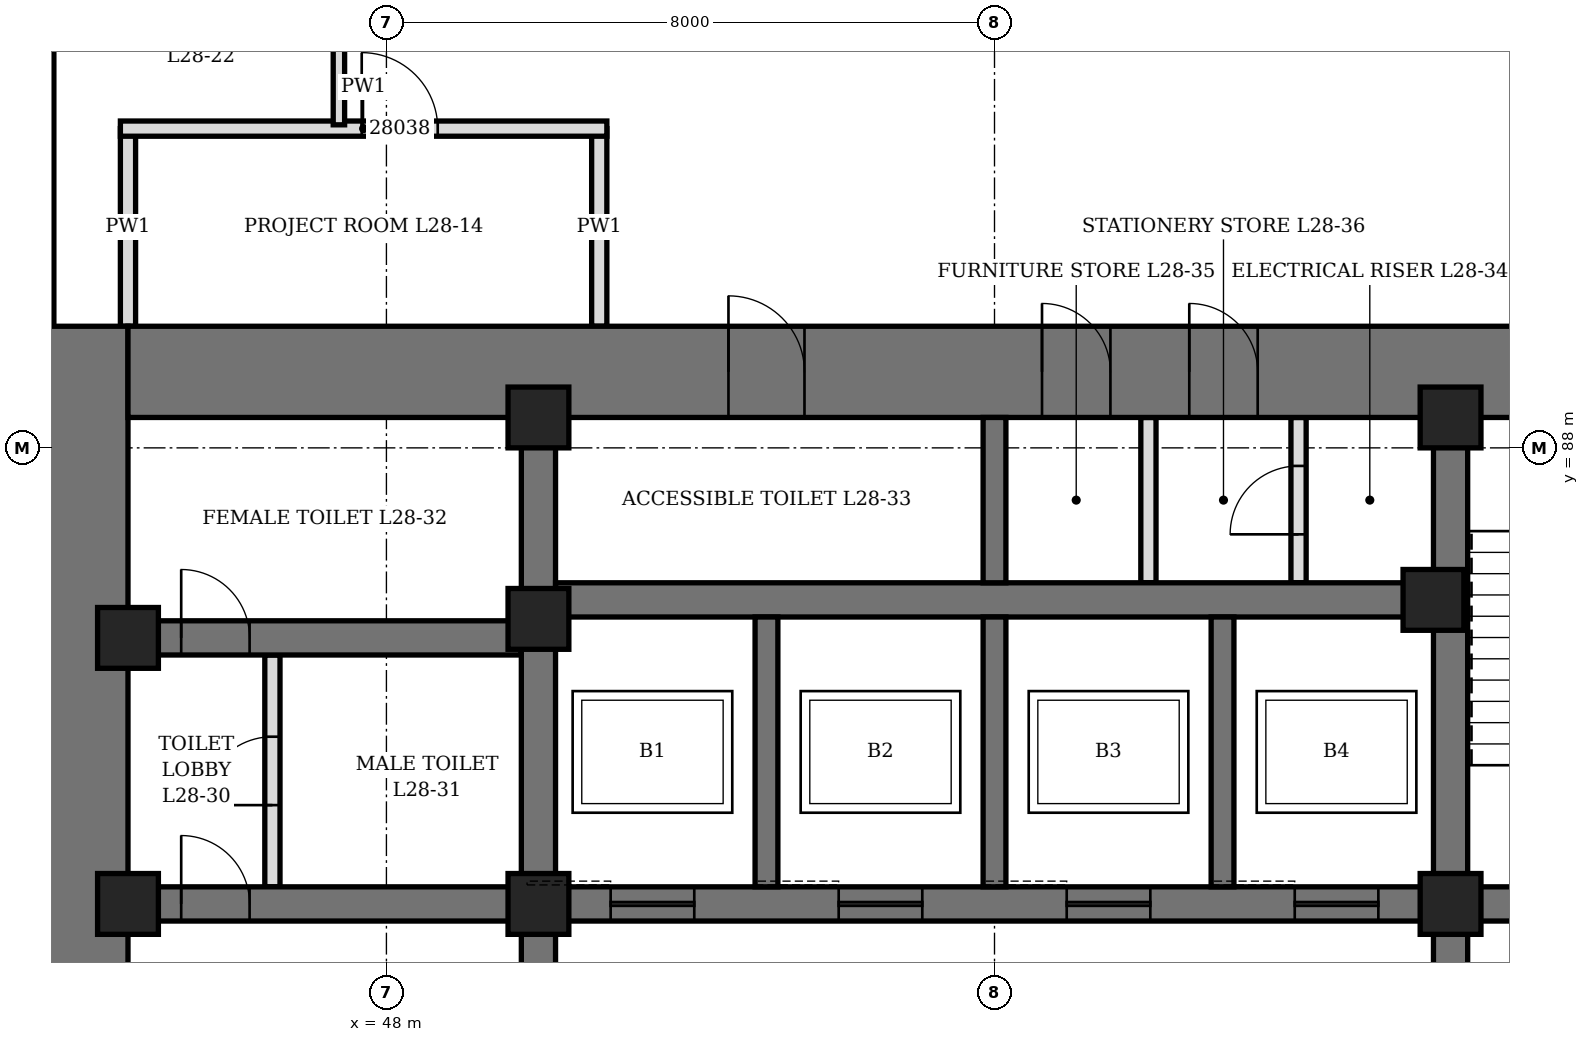
"""IFC4 building model, lengths in metres.
Left out: names, types, materials, properties, quantities, classifications, styles, units other than length and angle.
Written with IfcOpenShell. Run it as: python <this file> out.ifc"""

import sys

from ifc_helpers import new_model, si_unit, direction, frame, frame_2d, origin, origin_2d, place, context, subcontext, project, spatial, rectangle, hollow_rectangle, extrude, element, fill, save


model = new_model("IFC4")
c1 = context("Model", 3, precision=1e-05, world=origin(), true_north=direction((0.0, 1.0)))
c2 = subcontext(c1, "Body", "Model", "MODEL_VIEW")
j1 = project(units=[si_unit("LENGTHUNIT", "METRE"), si_unit("PLANEANGLEUNIT", "RADIAN")], contexts=[c1])
p1 = place(None, origin())
s1 = spatial("IfcSite", under=j1, at=p1, CompositionType="ELEMENT")
p2 = place(p1, origin())
s2 = spatial("IfcBuilding", under=s1, at=p2, CompositionType="ELEMENT")
p3 = place(p2, frame((0.0, 0.0, 129.1)))
s3 = spatial("IfcBuildingStorey", under=s2, at=p3, CompositionType="ELEMENT", Elevation=129.1)
p4 = place(p3, frame((44.0, 70.4, 0.0), z_axis=(0.0, 0.0, 1.0), x_axis=(0.0, 1.0, 0.0)))
e1 = element("IfcWall", 1, at=p4, inside=s3, PredefinedType="SHEAR", context=c2, shape_type="SweptSolid", body=[
    extrude(rectangle(XDim=19.2, YDim=1.2, at=frame_2d((9.6, 0.0))), origin(), (0.0, 0.0, 1.0), 4.2),
])
p5 = place(p4, frame((8.6, 0.0, 0.0)))
e2 = element("IfcOpeningElement", 2, at=p5, cuts=e1, PredefinedType="OPENING", context=c2, shape_type="SweptSolid", body=[
    extrude(rectangle(XDim=2.0, YDim=2.4, at=frame_2d((1.0, 1.2))), frame((0.0, 0.61, 0.0), z_axis=(0.0, -1.0, 0.0), x_axis=(1.0, 0.0, 0.0)), (0.0, 0.0, 1.0), 1.22),
])
p6 = place(p3, frame((44.6, 89.0, 0.0), z_axis=(0.0, 0.0, 1.0), x_axis=(1.0, 0.0, 0.0)))
e3 = element("IfcWall", 3, at=p6, inside=s3, PredefinedType="SHEAR", context=c2, shape_type="SweptSolid", body=[
    extrude(rectangle(XDim=22.8, YDim=1.2, at=frame_2d((11.4, 0.0))), origin(), (0.0, 0.0, 1.0), 4.2),
])
p7 = place(p6, frame((7.9, 0.0, 0.0)))
e4 = element("IfcOpeningElement", 4, at=p7, cuts=e3, PredefinedType="OPENING", context=c2, shape_type="SweptSolid", body=[
    extrude(rectangle(XDim=1.0, YDim=2.1, at=frame_2d((0.5, 1.05))), frame((0.0, 0.61, 0.0), z_axis=(0.0, -1.0, 0.0), x_axis=(1.0, 0.0, 0.0)), (0.0, 0.0, 1.0), 1.22),
])
p8 = place(p6, frame((12.025, 0.0, 0.0)))
e5 = element("IfcOpeningElement", 5, at=p8, cuts=e3, PredefinedType="OPENING", context=c2, shape_type="SweptSolid", body=[
    extrude(rectangle(XDim=0.9, YDim=2.1, at=frame_2d((0.45, 1.05))), frame((0.0, 0.61, 0.0), z_axis=(0.0, -1.0, 0.0), x_axis=(1.0, 0.0, 0.0)), (0.0, 0.0, 1.0), 1.22),
])
p9 = place(p6, frame((13.962, 0.0, 0.0)))
e6 = element("IfcOpeningElement", 6, at=p9, cuts=e3, PredefinedType="OPENING", context=c2, shape_type="SweptSolid", body=[
    extrude(rectangle(XDim=0.9, YDim=2.1, at=frame_2d((0.45, 1.05))), frame((0.0, 0.61, 0.0), z_axis=(0.0, -1.0, 0.0), x_axis=(1.0, 0.0, 0.0)), (0.0, 0.0, 1.0), 1.22),
])
p10 = place(p3, frame((50.0, 71.6, 0.0), z_axis=(0.0, 0.0, 1.0), x_axis=(0.0, 1.0, 0.0)))
e7 = element("IfcWall", 7, at=p10, inside=s3, PredefinedType="SHEAR", context=c2, shape_type="SweptSolid", body=[
    extrude(rectangle(XDim=16.8, YDim=0.45, at=frame_2d((8.4, 0.0))), origin(), (0.0, 0.0, 1.0), 4.2),
])
p11 = place(p10, frame((7.5, 0.0, 0.0)))
e8 = element("IfcOpeningElement", 8, at=p11, cuts=e7, PredefinedType="OPENING", context=c2, shape_type="SweptSolid", body=[
    extrude(rectangle(XDim=1.8, YDim=2.4, at=frame_2d((0.9, 1.2))), frame((0.0, 0.235, 0.0), z_axis=(0.0, -1.0, 0.0), x_axis=(1.0, 0.0, 0.0)), (0.0, 0.0, 1.0), 0.47),
])
p12 = place(p3, frame((62.0, 71.6, 0.0), z_axis=(0.0, 0.0, 1.0), x_axis=(0.0, 1.0, 0.0)))
e9 = element("IfcWall", 9, at=p12, inside=s3, PredefinedType="SHEAR", context=c2, shape_type="SweptSolid", body=[
    extrude(rectangle(XDim=16.8, YDim=0.45, at=frame_2d((8.4, 0.0))), origin(), (0.0, 0.0, 1.0), 4.2),
])
p13 = place(p12, frame((7.5, 0.0, 0.0)))
e10 = element("IfcOpeningElement", 10, at=p13, cuts=e9, PredefinedType="OPENING", context=c2, shape_type="SweptSolid", body=[
    extrude(rectangle(XDim=1.8, YDim=2.4, at=frame_2d((0.9, 1.2))), frame((0.0, 0.235, 0.0), z_axis=(0.0, -1.0, 0.0), x_axis=(1.0, 0.0, 0.0)), (0.0, 0.0, 1.0), 0.47),
])
p14 = place(p3, frame((44.6, 82.0, 0.0), z_axis=(0.0, 0.0, 1.0), x_axis=(1.0, 0.0, 0.0)))
e11 = element("IfcWall", 11, at=p14, inside=s3, PredefinedType="SHEAR", context=c2, shape_type="SweptSolid", body=[
    extrude(rectangle(XDim=5.175, YDim=0.45, at=frame_2d((2.587, 0.0))), origin(), (0.0, 0.0, 1.0), 4.2),
])
p15 = place(p14, frame((0.7, 0.0, 0.0)))
e12 = element("IfcOpeningElement", 12, at=p15, cuts=e11, PredefinedType="OPENING", context=c2, shape_type="SweptSolid", body=[
    extrude(rectangle(XDim=0.9, YDim=2.1, at=frame_2d((0.45, 1.05))), frame((0.0, 0.235, 0.0), z_axis=(0.0, -1.0, 0.0), x_axis=(1.0, 0.0, 0.0)), (0.0, 0.0, 1.0), 0.47),
])
p16 = place(p3, frame((44.6, 85.5, 0.0), z_axis=(0.0, 0.0, 1.0), x_axis=(1.0, 0.0, 0.0)))
e13 = element("IfcWall", 13, at=p16, inside=s3, PredefinedType="SHEAR", context=c2, shape_type="SweptSolid", body=[
    extrude(rectangle(XDim=5.175, YDim=0.45, at=frame_2d((2.587, 0.0))), origin(), (0.0, 0.0, 1.0), 4.2),
])
p17 = place(p16, frame((0.7, 0.0, 0.0)))
e14 = element("IfcOpeningElement", 14, at=p17, cuts=e13, PredefinedType="OPENING", context=c2, shape_type="SweptSolid", body=[
    extrude(rectangle(XDim=0.9, YDim=2.1, at=frame_2d((0.45, 1.05))), frame((0.0, 0.235, 0.0), z_axis=(0.0, -1.0, 0.0), x_axis=(1.0, 0.0, 0.0)), (0.0, 0.0, 1.0), 0.47),
])
p18 = place(p3, frame((62.225, 82.0, 0.0), z_axis=(0.0, 0.0, 1.0), x_axis=(1.0, 0.0, 0.0)))
e15 = element("IfcWall", 15, at=p18, inside=s3, PredefinedType="SHEAR", context=c2, shape_type="SweptSolid", body=[
    extrude(rectangle(XDim=5.175, YDim=0.45, at=frame_2d((2.587, 0.0))), origin(), (0.0, 0.0, 1.0), 4.2),
])
p19 = place(p18, frame((2.175, 0.0, 0.0)))
e16 = element("IfcOpeningElement", 16, at=p19, cuts=e15, PredefinedType="OPENING", context=c2, shape_type="SweptSolid", body=[
    extrude(rectangle(XDim=1.2, YDim=2.1, at=frame_2d((0.6, 1.05))), frame((0.0, 0.235, 0.0), z_axis=(0.0, -1.0, 0.0), x_axis=(1.0, 0.0, 0.0)), (0.0, 0.0, 1.0), 0.47),
])
p20 = place(p3, frame((50.225, 82.0, 0.0), z_axis=(0.0, 0.0, 1.0), x_axis=(1.0, 0.0, 0.0)))
e17 = element("IfcWall", 17, at=p20, inside=s3, PredefinedType="SHEAR", context=c2, shape_type="SweptSolid", body=[
    extrude(rectangle(XDim=11.55, YDim=0.45, at=frame_2d((5.775, 0.0))), origin(), (0.0, 0.0, 1.0), 4.2),
])
p21 = place(p20, frame((0.725, 0.0, 0.0)))
e18 = element("IfcOpeningElement", 18, at=p21, cuts=e17, PredefinedType="OPENING", context=c2, shape_type="SweptSolid", body=[
    extrude(rectangle(XDim=1.1, YDim=2.2, at=frame_2d((0.55, 1.1))), frame((0.0, 0.235, 0.0), z_axis=(0.0, -1.0, 0.0), x_axis=(1.0, 0.0, 0.0)), (0.0, 0.0, 1.0), 0.47),
])
p22 = place(p20, frame((3.725, 0.0, 0.0)))
e19 = element("IfcOpeningElement", 19, at=p22, cuts=e17, PredefinedType="OPENING", context=c2, shape_type="SweptSolid", body=[
    extrude(rectangle(XDim=1.1, YDim=2.2, at=frame_2d((0.55, 1.1))), frame((0.0, 0.235, 0.0), z_axis=(0.0, -1.0, 0.0), x_axis=(1.0, 0.0, 0.0)), (0.0, 0.0, 1.0), 0.47),
])
p23 = place(p20, frame((6.725, 0.0, 0.0)))
e20 = element("IfcOpeningElement", 20, at=p23, cuts=e17, PredefinedType="OPENING", context=c2, shape_type="SweptSolid", body=[
    extrude(rectangle(XDim=1.1, YDim=2.2, at=frame_2d((0.55, 1.1))), frame((0.0, 0.235, 0.0), z_axis=(0.0, -1.0, 0.0), x_axis=(1.0, 0.0, 0.0)), (0.0, 0.0, 1.0), 0.47),
])
p24 = place(p20, frame((9.725, 0.0, 0.0)))
e21 = element("IfcOpeningElement", 21, at=p24, cuts=e17, PredefinedType="OPENING", context=c2, shape_type="SweptSolid", body=[
    extrude(rectangle(XDim=1.1, YDim=2.2, at=frame_2d((0.55, 1.1))), frame((0.0, 0.235, 0.0), z_axis=(0.0, -1.0, 0.0), x_axis=(1.0, 0.0, 0.0)), (0.0, 0.0, 1.0), 0.47),
])
p25 = place(p3, frame((50.225, 86.0, 0.0), z_axis=(0.0, 0.0, 1.0), x_axis=(1.0, 0.0, 0.0)))
e22 = element("IfcWall", 22, at=p25, inside=s3, PredefinedType="SHEAR", context=c2, shape_type="SweptSolid", body=[
    extrude(rectangle(XDim=11.55, YDim=0.45, at=frame_2d((5.775, 0.0))), origin(), (0.0, 0.0, 1.0), 4.2),
])
for number, where, z_axis, x_axis in (
    (23, (53.0, 82.225, 0.0), (0.0, 0.0, 1.0), (0.0, 1.0, 0.0)),
    (24, (56.0, 82.225, 0.0), (0.0, 0.0, 1.0), (0.0, 1.0, 0.0)),
    (25, (59.0, 82.225, 0.0), (0.0, 0.0, 1.0), (0.0, 1.0, 0.0)),
):
    element("IfcWall", number, at=place(p3, frame(where, z_axis=z_axis, x_axis=x_axis)), inside=s3, PredefinedType="SHEAR", context=c2, shape_type="SweptSolid", body=[
        extrude(rectangle(XDim=3.55, YDim=0.3, at=frame_2d((1.775, 0.0))), origin(), (0.0, 0.0, 1.0), 4.2),
    ])
p26 = place(p3, frame((56.0, 86.225, 0.0), z_axis=(0.0, 0.0, 1.0), x_axis=(0.0, 1.0, 0.0)))
e26 = element("IfcWall", 26, at=p26, inside=s3, PredefinedType="SHEAR", context=c2, shape_type="SweptSolid", body=[
    extrude(rectangle(XDim=2.175, YDim=0.3, at=frame_2d((1.087, 0.0))), origin(), (0.0, 0.0, 1.0), 4.2),
])
for number, where, z_axis, x_axis in (
    (27, (44.6, 82.0, 0.0), (0.0, 0.0, 1.0), (1.0, 0.0, 0.0)),
    (28, (44.6, 85.5, 0.0), (0.0, 0.0, 1.0), (1.0, 0.0, 0.0)),
    (29, (50.0, 82.0, 0.0), (0.0, 0.0, 1.0), (1.0, 0.0, 0.0)),
    (30, (50.0, 85.75, 0.0), (0.0, 0.0, 1.0), (1.0, 0.0, 0.0)),
    (31, (50.0, 88.4, 0.0), (0.0, 0.0, 1.0), (1.0, 0.0, 0.0)),
    (32, (61.775, 86.0, 0.0), (0.0, 0.0, 1.0), (1.0, 0.0, 0.0)),
    (33, (62.0, 82.0, 0.0), (0.0, 0.0, 1.0), (1.0, 0.0, 0.0)),
    (34, (62.0, 88.4, 0.0), (0.0, 0.0, 1.0), (1.0, 0.0, 0.0)),
):
    element("IfcColumn", number, at=place(p3, frame(where, z_axis=z_axis, x_axis=x_axis)), inside=s3, PredefinedType="COLUMN", context=c2, shape_type="SweptSolid", body=[
        extrude(hollow_rectangle(XDim=0.8, YDim=0.8, WallThickness=0.1, at=origin_2d()), origin(), (0.0, 0.0, 1.0), 4.2),
    ])
p27 = place(p3, frame((46.5, 82.225, 0.0), z_axis=(0.0, 0.0, 1.0), x_axis=(0.0, 1.0, 0.0)))
e35 = element("IfcWall", 35, at=p27, inside=s3, PredefinedType="PARTITIONING", context=c2, shape_type="SweptSolid", body=[
    extrude(rectangle(XDim=3.05, YDim=0.2, at=frame_2d((1.525, 0.0))), origin(), (0.0, 0.0, 1.0), 4.04),
])
p28 = place(p27, frame((1.075, 0.0, 0.0)))
e36 = element("IfcOpeningElement", 36, at=p28, cuts=e35, PredefinedType="OPENING", context=c2, shape_type="SweptSolid", body=[
    extrude(rectangle(XDim=0.9, YDim=2.1, at=frame_2d((0.45, 1.05))), frame((0.0, 0.11, 0.0), z_axis=(0.0, -1.0, 0.0), x_axis=(1.0, 0.0, 0.0)), (0.0, 0.0, 1.0), 0.22),
])
p29 = place(p3, frame((60.0, 86.225, 0.0), z_axis=(0.0, 0.0, 1.0), x_axis=(0.0, 1.0, 0.0)))
e37 = element("IfcWall", 37, at=p29, inside=s3, PredefinedType="PARTITIONING", context=c2, shape_type="SweptSolid", body=[
    extrude(rectangle(XDim=2.175, YDim=0.2, at=frame_2d((1.087, 0.0))), origin(), (0.0, 0.0, 1.0), 4.04),
])
p30 = place(p29, frame((0.637, 0.0, 0.0)))
e38 = element("IfcOpeningElement", 38, at=p30, cuts=e37, PredefinedType="OPENING", context=c2, shape_type="SweptSolid", body=[
    extrude(rectangle(XDim=0.9, YDim=2.1, at=frame_2d((0.45, 1.05))), frame((0.0, 0.11, 0.0), z_axis=(0.0, -1.0, 0.0), x_axis=(1.0, 0.0, 0.0)), (0.0, 0.0, 1.0), 0.22),
])
p31 = place(p3, frame((58.025, 86.225, 0.0), z_axis=(0.0, 0.0, 1.0), x_axis=(0.0, 1.0, 0.0)))
e39 = element("IfcWall", 39, at=p31, inside=s3, PredefinedType="PARTITIONING", context=c2, shape_type="SweptSolid", body=[
    extrude(rectangle(XDim=2.175, YDim=0.2, at=frame_2d((1.087, 0.0))), origin(), (0.0, 0.0, 1.0), 4.04),
])
p32 = place(p3, frame((44.6, 89.6, 0.0), z_axis=(0.0, 0.0, 1.0), x_axis=(0.0, 1.0, 0.0)))
e40 = element("IfcWall", 40, at=p32, inside=s3, PredefinedType="PARTITIONING", context=c2, shape_type="SweptSolid", body=[
    extrude(rectangle(XDim=2.6, YDim=0.2, at=frame_2d((1.3, 0.0))), origin(), (0.0, 0.0, 1.0), 2.74),
])
p33 = place(p3, frame((50.8, 89.6, 0.0), z_axis=(0.0, 0.0, 1.0), x_axis=(0.0, 1.0, 0.0)))
e41 = element("IfcWall", 41, at=p33, inside=s3, PredefinedType="PARTITIONING", context=c2, shape_type="SweptSolid", body=[
    extrude(rectangle(XDim=2.6, YDim=0.2, at=frame_2d((1.3, 0.0))), origin(), (0.0, 0.0, 1.0), 4.04),
])
p34 = place(p3, frame((44.5, 92.2, 0.0), z_axis=(0.0, 0.0, 1.0), x_axis=(1.0, 0.0, 0.0)))
e42 = element("IfcWall", 42, at=p34, inside=s3, PredefinedType="PARTITIONING", context=c2, shape_type="SweptSolid", body=[
    extrude(rectangle(XDim=6.4, YDim=0.2, at=frame_2d((3.2, 0.0))), origin(), (0.0, 0.0, 1.0), 4.04),
])
p35 = place(p34, frame((3.175, 0.0, 0.0)))
e43 = element("IfcOpeningElement", 43, at=p35, cuts=e42, PredefinedType="OPENING", context=c2, shape_type="SweptSolid", body=[
    extrude(rectangle(XDim=1.0, YDim=2.1, at=frame_2d((0.5, 1.05))), frame((0.0, 0.11, 0.0), z_axis=(0.0, -1.0, 0.0), x_axis=(1.0, 0.0, 0.0)), (0.0, 0.0, 1.0), 0.22),
])
p36 = place(p3, frame((43.55, 89.6, 0.0), z_axis=(0.0, 0.0, 1.0), x_axis=(0.0, 1.0, 0.0)))
e44 = element("IfcWall", 44, at=p36, inside=s3, PredefinedType="PARTITIONING", context=c2, shape_type="SweptSolid", body=[
    extrude(rectangle(XDim=13.59, YDim=0.15, at=frame_2d((6.795, 0.0))), origin(), (0.0, 0.0, 1.0), 4.04),
])
p37 = place(p36, frame((6.295, 0.0, 0.0)))
e45 = element("IfcOpeningElement", 45, at=p37, cuts=e44, PredefinedType="OPENING", context=c2, shape_type="SweptSolid", body=[
    extrude(rectangle(XDim=1.0, YDim=2.4, at=frame_2d((0.5, 1.2))), frame((0.0, 0.085, 0.0), z_axis=(0.0, -1.0, 0.0), x_axis=(1.0, 0.0, 0.0)), (0.0, 0.0, 1.0), 0.17),
])
p38 = place(p3, frame((47.375, 92.25, 0.0), z_axis=(0.0, 0.0, 1.0), x_axis=(0.0, 1.0, 0.0)))
e46 = element("IfcWall", 46, at=p38, inside=s3, PredefinedType="PARTITIONING", context=c2, shape_type="SweptSolid", body=[
    extrude(rectangle(XDim=4.95, YDim=0.15, at=frame_2d((2.475, 0.0))), origin(), (0.0, 0.0, 1.0), 3.278),
])
p39 = place(p38, frame((1.975, 0.0, 0.0)))
e47 = element("IfcOpeningElement", 47, at=p39, cuts=e46, PredefinedType="OPENING", context=c2, shape_type="SweptSolid", body=[
    extrude(rectangle(XDim=1.0, YDim=2.4, at=frame_2d((0.5, 1.2))), frame((0.0, 0.085, 0.0), z_axis=(0.0, -1.0, 0.0), x_axis=(1.0, 0.0, 0.0)), (0.0, 0.0, 1.0), 0.17),
])
p40 = place(p15, origin())
e48 = element("IfcDoor", 48, at=p40, inside=s3, OperationType="SINGLE_SWING_LEFT", PredefinedType="DOOR", context=c2, shape_type="SweptSolid", body=[
    extrude(rectangle(XDim=0.9, YDim=2.1, at=frame_2d((0.45, 1.05))), frame((0.0, 0.225, 0.0), z_axis=(0.0, -1.0, 0.0), x_axis=(1.0, 0.0, 0.0)), (0.0, 0.0, 1.0), 0.449),
])
fill(e12, e48)
p41 = place(p28, origin())
e49 = element("IfcDoor", 49, at=p41, inside=s3, OperationType="SINGLE_SWING_RIGHT", PredefinedType="DOOR", context=c2, shape_type="SweptSolid", body=[
    extrude(rectangle(XDim=0.9, YDim=2.1, at=frame_2d((0.45, 1.05))), frame((0.0, 0.1, 0.0), z_axis=(0.0, -1.0, 0.0), x_axis=(1.0, 0.0, 0.0)), (0.0, 0.0, 1.0), 0.199),
])
fill(e36, e49)
p42 = place(p17, origin())
e50 = element("IfcDoor", 50, at=p42, inside=s3, OperationType="SINGLE_SWING_RIGHT", PredefinedType="DOOR", context=c2, shape_type="SweptSolid", body=[
    extrude(rectangle(XDim=0.9, YDim=2.1, at=frame_2d((0.45, 1.05))), frame((0.0, 0.225, 0.0), z_axis=(0.0, -1.0, 0.0), x_axis=(1.0, 0.0, 0.0)), (0.0, 0.0, 1.0), 0.449),
])
fill(e14, e50)
p43 = place(p7, origin())
e51 = element("IfcDoor", 51, at=p43, inside=s3, OperationType="SINGLE_SWING_LEFT", PredefinedType="DOOR", context=c2, shape_type="SweptSolid", body=[
    extrude(rectangle(XDim=1.0, YDim=2.1, at=frame_2d((0.5, 1.05))), frame((0.0, 0.35, 0.0), z_axis=(0.0, -1.0, 0.0), x_axis=(1.0, 0.0, 0.0)), (0.0, 0.0, 1.0), 0.7),
])
fill(e4, e51)
p44 = place(p8, origin())
e52 = element("IfcDoor", 52, at=p44, inside=s3, OperationType="SINGLE_SWING_LEFT", PredefinedType="DOOR", context=c2, shape_type="SweptSolid", body=[
    extrude(rectangle(XDim=0.9, YDim=2.1, at=frame_2d((0.45, 1.05))), frame((0.0, 0.35, 0.0), z_axis=(0.0, -1.0, 0.0), x_axis=(1.0, 0.0, 0.0)), (0.0, 0.0, 1.0), 0.7),
])
fill(e5, e52)
p45 = place(p9, origin())
e53 = element("IfcDoor", 53, at=p45, inside=s3, OperationType="SINGLE_SWING_LEFT", PredefinedType="DOOR", context=c2, shape_type="SweptSolid", body=[
    extrude(rectangle(XDim=0.9, YDim=2.1, at=frame_2d((0.45, 1.05))), frame((0.0, 0.35, 0.0), z_axis=(0.0, -1.0, 0.0), x_axis=(1.0, 0.0, 0.0)), (0.0, 0.0, 1.0), 0.7),
])
fill(e6, e53)
p46 = place(p30, origin())
e54 = element("IfcDoor", 54, at=p46, inside=s3, OperationType="SINGLE_SWING_LEFT", PredefinedType="DOOR", context=c2, shape_type="SweptSolid", body=[
    extrude(rectangle(XDim=0.9, YDim=2.1, at=frame_2d((0.45, 1.05))), frame((0.0, 0.1, 0.0), z_axis=(0.0, -1.0, 0.0), x_axis=(1.0, 0.0, 0.0)), (0.0, 0.0, 1.0), 0.199),
])
fill(e38, e54)
p47 = place(p21, origin())
e55 = element("IfcDoor", 55, at=p47, inside=s3, OperationType="SLIDING_TO_LEFT", PredefinedType="DOOR", context=c2, shape_type="SweptSolid", body=[
    extrude(rectangle(XDim=1.1, YDim=2.2, at=frame_2d((0.55, 1.1))), frame((0.0, 0.225, 0.0), z_axis=(0.0, -1.0, 0.0), x_axis=(1.0, 0.0, 0.0)), (0.0, 0.0, 1.0), 0.449),
])
fill(e18, e55)
p48 = place(p22, origin())
e56 = element("IfcDoor", 56, at=p48, inside=s3, OperationType="SLIDING_TO_LEFT", PredefinedType="DOOR", context=c2, shape_type="SweptSolid", body=[
    extrude(rectangle(XDim=1.1, YDim=2.2, at=frame_2d((0.55, 1.1))), frame((0.0, 0.225, 0.0), z_axis=(0.0, -1.0, 0.0), x_axis=(1.0, 0.0, 0.0)), (0.0, 0.0, 1.0), 0.449),
])
fill(e19, e56)
p49 = place(p23, origin())
e57 = element("IfcDoor", 57, at=p49, inside=s3, OperationType="SLIDING_TO_LEFT", PredefinedType="DOOR", context=c2, shape_type="SweptSolid", body=[
    extrude(rectangle(XDim=1.1, YDim=2.2, at=frame_2d((0.55, 1.1))), frame((0.0, 0.225, 0.0), z_axis=(0.0, -1.0, 0.0), x_axis=(1.0, 0.0, 0.0)), (0.0, 0.0, 1.0), 0.449),
])
fill(e20, e57)
p50 = place(p24, origin())
e58 = element("IfcDoor", 58, at=p50, inside=s3, OperationType="SLIDING_TO_LEFT", PredefinedType="DOOR", context=c2, shape_type="SweptSolid", body=[
    extrude(rectangle(XDim=1.1, YDim=2.2, at=frame_2d((0.55, 1.1))), frame((0.0, 0.225, 0.0), z_axis=(0.0, -1.0, 0.0), x_axis=(1.0, 0.0, 0.0)), (0.0, 0.0, 1.0), 0.449),
])
fill(e21, e58)
p51 = place(p35, origin())
e59 = element("IfcDoor", 59, at=p51, inside=s3, OperationType="SINGLE_SWING_LEFT", PredefinedType="DOOR", context=c2, shape_type="SweptSolid", body=[
    extrude(rectangle(XDim=1.0, YDim=2.1, at=frame_2d((0.5, 1.05))), frame((0.0, 0.1, 0.0), z_axis=(0.0, -1.0, 0.0), x_axis=(1.0, 0.0, 0.0)), (0.0, 0.0, 1.0), 0.199),
])
fill(e43, e59)
save(model, sys.argv[1])
